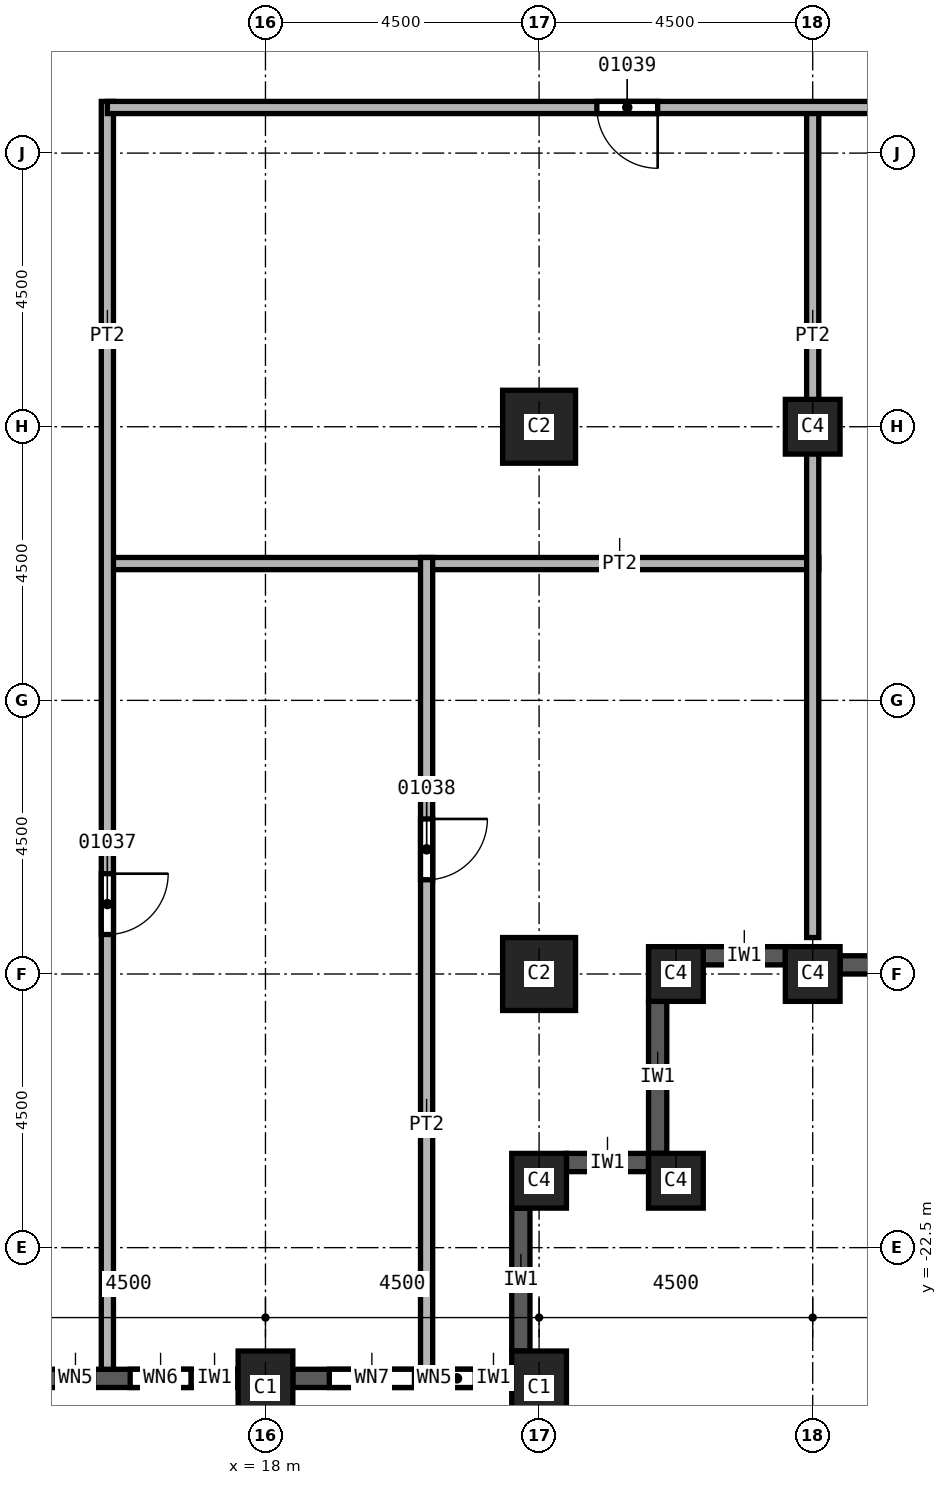
"""IFC4 building model, lengths in metres.
Left out: names, types, materials, properties, quantities, classifications, styles, units other than length and angle.
Written with IfcOpenShell. Run it as: python <this file> out.ifc"""

import sys

from ifc_helpers import new_model, si_unit, direction, frame, frame_2d, origin, origin_2d, place, context, subcontext, project, spatial, rectangle, extrude, element, fill, save


model = new_model("IFC4")
c1 = context("Model", 3, precision=1e-05, world=origin(), true_north=direction((0.0, 1.0)))
c2 = subcontext(c1, "Body", "Model", "MODEL_VIEW")
j1 = project(units=[si_unit("LENGTHUNIT", "METRE"), si_unit("PLANEANGLEUNIT", "RADIAN")], contexts=[c1])
p1 = place(None, origin())
s1 = spatial("IfcSite", under=j1, at=p1, CompositionType="ELEMENT")
p2 = place(p1, origin())
s2 = spatial("IfcBuilding", under=s1, at=p2, CompositionType="ELEMENT")
p3 = place(p2, frame((0.0, 0.0, 68.0)))
s3 = spatial("IfcBuildingStorey", under=s2, at=p3, CompositionType="ELEMENT", Elevation=68.0)
for number, where, z_axis, x_axis in (
    (1, (22.5, -9.0, 0.0), (0.0, 0.0, 1.0), (1.0, 0.0, 0.0)),
    (2, (22.5, -18.0, 0.0), (0.0, 0.0, 1.0), (1.0, 0.0, 0.0)),
):
    element("IfcColumn", number, at=place(p3, frame(where, z_axis=z_axis, x_axis=x_axis)), inside=s3, PredefinedType="COLUMN", context=c2, shape_type="SweptSolid", body=[
        extrude(rectangle(XDim=1.2, YDim=1.2, at=origin_2d()), origin(), (0.0, 0.0, 1.0), 3.7),
    ])
for number, where, z_axis, x_axis in (
    (3, (27.0, -9.0, 0.0), (0.0, 0.0, 1.0), (1.0, 0.0, 0.0)),
    (4, (27.0, -18.0, 0.0), (0.0, 0.0, 1.0), (1.0, 0.0, 0.0)),
):
    element("IfcColumn", number, at=place(p3, frame(where, z_axis=z_axis, x_axis=x_axis)), inside=s3, PredefinedType="COLUMN", context=c2, shape_type="SweptSolid", body=[
        extrude(rectangle(XDim=0.9, YDim=0.9, at=origin_2d()), origin(), (0.0, 0.0, 1.0), 3.7),
    ])
for number, where, z_axis, x_axis in (
    (5, (18.0, -24.8, 0.0), (0.0, 0.0, 1.0), (1.0, 0.0, 0.0)),
    (6, (22.5, -24.8, 0.0), (0.0, 0.0, 1.0), (1.0, 0.0, 0.0)),
):
    element("IfcColumn", number, at=place(p3, frame(where, z_axis=z_axis, x_axis=x_axis)), inside=s3, PredefinedType="COLUMN", context=c2, shape_type="SweptSolid", body=[
        extrude(rectangle(XDim=0.9, YDim=1.2, at=origin_2d()), origin(), (0.0, 0.0, 1.0), 3.7),
    ])
for number, where, z_axis, x_axis in (
    (7, (22.5, -21.4, 0.0), (0.0, 0.0, 1.0), (1.0, 0.0, 0.0)),
    (8, (24.75, -21.4, 0.0), (0.0, 0.0, 1.0), (1.0, 0.0, 0.0)),
    (9, (24.75, -18.0, 0.0), (0.0, 0.0, 1.0), (1.0, 0.0, 0.0)),
):
    element("IfcColumn", number, at=place(p3, frame(where, z_axis=z_axis, x_axis=x_axis)), inside=s3, PredefinedType="COLUMN", context=c2, shape_type="SweptSolid", body=[
        extrude(rectangle(XDim=0.9, YDim=0.9, at=origin_2d()), origin(), (0.0, 0.0, 1.0), 3.7),
    ])
p4 = place(p3, frame((13.95, -24.65, 0.0), z_axis=(0.0, 0.0, 1.0), x_axis=(1.0, 0.0, 0.0)))
e10 = element("IfcWall", 10, at=p4, inside=s3, PredefinedType="SOLIDWALL", context=c2, shape_type="SweptSolid", body=[
    extrude(rectangle(XDim=3.6, YDim=0.3, at=frame_2d((1.8, 0.0))), origin(), (0.0, 0.0, 1.0), 3.1),
])
p5 = place(p4, frame((0.625, 0.0, 0.8)))
e11 = element("IfcOpeningElement", 11, at=p5, cuts=e10, PredefinedType="OPENING", context=c2, shape_type="SweptSolid", body=[
    extrude(rectangle(XDim=0.6, YDim=1.95, at=frame_2d((0.3, 0.975))), frame((0.0, 0.15, 0.0), z_axis=(0.0, -1.0, 0.0), x_axis=(1.0, 0.0, 0.0)), (0.0, 0.0, 1.0), 0.3),
])
p6 = place(p4, frame((1.825, 0.0, 0.8)))
e12 = element("IfcOpeningElement", 12, at=p6, cuts=e10, PredefinedType="OPENING", context=c2, shape_type="SweptSolid", body=[
    extrude(rectangle(XDim=1.0, YDim=1.95, at=frame_2d((0.5, 0.975))), frame((0.0, 0.15, 0.0), z_axis=(0.0, -1.0, 0.0), x_axis=(1.0, 0.0, 0.0)), (0.0, 0.0, 1.0), 0.3),
])
p7 = place(p3, frame((18.45, -24.65, 0.0), z_axis=(0.0, 0.0, 1.0), x_axis=(1.0, 0.0, 0.0)))
e13 = element("IfcWall", 13, at=p7, inside=s3, PredefinedType="SOLIDWALL", context=c2, shape_type="SweptSolid", body=[
    extrude(rectangle(XDim=3.6, YDim=0.3, at=frame_2d((1.8, 0.0))), origin(), (0.0, 0.0, 1.0), 3.1),
])
p8 = place(p7, frame((0.6, 0.0, 0.8)))
e14 = element("IfcOpeningElement", 14, at=p8, cuts=e13, PredefinedType="OPENING", context=c2, shape_type="SweptSolid", body=[
    extrude(rectangle(XDim=1.4, YDim=1.95, at=frame_2d((0.7, 0.975))), frame((0.0, 0.15, 0.0), z_axis=(0.0, -1.0, 0.0), x_axis=(1.0, 0.0, 0.0)), (0.0, 0.0, 1.0), 0.3),
])
p9 = place(p7, frame((2.4, 0.0, 0.8)))
e15 = element("IfcOpeningElement", 15, at=p9, cuts=e13, PredefinedType="OPENING", context=c2, shape_type="SweptSolid", body=[
    extrude(rectangle(XDim=0.6, YDim=1.95, at=frame_2d((0.3, 0.975))), frame((0.0, 0.15, 0.0), z_axis=(0.0, -1.0, 0.0), x_axis=(1.0, 0.0, 0.0)), (0.0, 0.0, 1.0), 0.3),
])
p10 = place(p3, frame((22.2, -24.2, 0.0), z_axis=(0.0, 0.0, 1.0), x_axis=(0.0, 1.0, 0.0)))
e16 = element("IfcWall", 16, at=p10, inside=s3, PredefinedType="SOLIDWALL", context=c2, shape_type="SweptSolid", body=[
    extrude(rectangle(XDim=2.35, YDim=0.3, at=frame_2d((1.175, 0.0))), origin(), (0.0, 0.0, 1.0), 3.1),
])
p11 = place(p3, frame((22.95, -21.1, 0.0), z_axis=(0.0, 0.0, 1.0), x_axis=(1.0, 0.0, 0.0)))
e17 = element("IfcWall", 17, at=p11, inside=s3, PredefinedType="SOLIDWALL", context=c2, shape_type="SweptSolid", body=[
    extrude(rectangle(XDim=1.35, YDim=0.3, at=frame_2d((0.675, 0.0))), origin(), (0.0, 0.0, 1.0), 3.1),
])
p12 = place(p3, frame((24.45, -20.95, 0.0), z_axis=(0.0, 0.0, 1.0), x_axis=(0.0, 1.0, 0.0)))
e18 = element("IfcWall", 18, at=p12, inside=s3, PredefinedType="SOLIDWALL", context=c2, shape_type="SweptSolid", body=[
    extrude(rectangle(XDim=2.5, YDim=0.3, at=frame_2d((1.25, 0.0))), origin(), (0.0, 0.0, 1.0), 3.1),
])
p13 = place(p3, frame((25.2, -17.7, 0.0), z_axis=(0.0, 0.0, 1.0), x_axis=(1.0, 0.0, 0.0)))
e19 = element("IfcWall", 19, at=p13, inside=s3, PredefinedType="SOLIDWALL", context=c2, shape_type="SweptSolid", body=[
    extrude(rectangle(XDim=1.35, YDim=0.3, at=frame_2d((0.675, 0.0))), origin(), (0.0, 0.0, 1.0), 3.1),
])
p14 = place(p3, frame((27.45, -17.85, 0.0), z_axis=(0.0, 0.0, 1.0), x_axis=(1.0, 0.0, 0.0)))
e20 = element("IfcWall", 20, at=p14, inside=s3, PredefinedType="SOLIDWALL", context=c2, shape_type="SweptSolid", body=[
    extrude(rectangle(XDim=3.6, YDim=0.3, at=frame_2d((1.8, 0.0))), origin(), (0.0, 0.0, 1.0), 3.1),
])
p15 = place(p14, frame((0.6, 0.0, 0.8)))
e21 = element("IfcOpeningElement", 21, at=p15, cuts=e20, PredefinedType="OPENING", context=c2, shape_type="SweptSolid", body=[
    extrude(rectangle(XDim=2.4, YDim=1.95, at=frame_2d((1.2, 0.975))), frame((0.0, 0.15, 0.0), z_axis=(0.0, -1.0, 0.0), x_axis=(1.0, 0.0, 0.0)), (0.0, 0.0, 1.0), 0.3),
])
p16 = place(p3, frame((15.4, -11.25, 0.0), z_axis=(0.0, 0.0, 1.0), x_axis=(1.0, 0.0, 0.0)))
e22 = element("IfcWall", 22, at=p16, inside=s3, PredefinedType="PARTITIONING", context=c2, shape_type="SweptSolid", body=[
    extrude(rectangle(XDim=11.7, YDim=0.2, at=frame_2d((5.85, 0.0))), origin(), (0.0, 0.0, 1.0), 3.7),
])
p17 = place(p3, frame((15.4, -3.65, 0.0), z_axis=(0.0, 0.0, 1.0), x_axis=(0.0, -1.0, 0.0)))
e23 = element("IfcWall", 23, at=p17, inside=s3, PredefinedType="PARTITIONING", context=c2, shape_type="SweptSolid", body=[
    extrude(rectangle(XDim=20.85, YDim=0.2, at=frame_2d((10.425, 0.0))), origin(), (0.0, 0.0, 1.0), 3.7),
])
p18 = place(p17, frame((12.7, 0.0, 0.0)))
e24 = element("IfcOpeningElement", 24, at=p18, cuts=e23, PredefinedType="OPENING", context=c2, shape_type="SweptSolid", body=[
    extrude(rectangle(XDim=1.0, YDim=2.1, at=frame_2d((0.5, 1.05))), frame((0.0, 0.1, 0.0), z_axis=(0.0, -1.0, 0.0), x_axis=(1.0, 0.0, 0.0)), (0.0, 0.0, 1.0), 0.2),
])
p19 = place(p3, frame((20.65, -11.15, 0.0), z_axis=(0.0, 0.0, 1.0), x_axis=(0.0, -1.0, 0.0)))
e25 = element("IfcWall", 25, at=p19, inside=s3, PredefinedType="PARTITIONING", context=c2, shape_type="SweptSolid", body=[
    extrude(rectangle(XDim=13.35, YDim=0.2, at=frame_2d((6.675, 0.0))), origin(), (0.0, 0.0, 1.0), 3.7),
])
p20 = place(p19, frame((4.3, 0.0, 0.0)))
e26 = element("IfcOpeningElement", 26, at=p20, cuts=e25, PredefinedType="OPENING", context=c2, shape_type="SweptSolid", body=[
    extrude(rectangle(XDim=1.0, YDim=2.1, at=frame_2d((0.5, 1.05))), frame((0.0, 0.1, 0.0), z_axis=(0.0, -1.0, 0.0), x_axis=(1.0, 0.0, 0.0)), (0.0, 0.0, 1.0), 0.2),
])
p21 = place(p3, frame((27.0, -3.75, 0.0), z_axis=(0.0, 0.0, 1.0), x_axis=(0.0, -1.0, 0.0)))
e27 = element("IfcWall", 27, at=p21, inside=s3, PredefinedType="PARTITIONING", context=c2, shape_type="SweptSolid", body=[
    extrude(rectangle(XDim=13.65, YDim=0.2, at=frame_2d((6.825, 0.0))), origin(), (0.0, 0.0, 1.0), 3.7),
])
p22 = place(p3, frame((33.85, -3.75, 0.0), z_axis=(0.0, 0.0, 1.0), x_axis=(-1.0, 0.0, 0.0)))
e28 = element("IfcWall", 28, at=p22, inside=s3, PredefinedType="PARTITIONING", context=c2, shape_type="SweptSolid", body=[
    extrude(rectangle(XDim=18.45, YDim=0.2, at=frame_2d((9.225, 0.0))), origin(), (0.0, 0.0, 1.0), 3.7),
])
p23 = place(p22, frame((9.4, 0.0, 0.0)))
e29 = element("IfcOpeningElement", 29, at=p23, cuts=e28, PredefinedType="OPENING", context=c2, shape_type="SweptSolid", body=[
    extrude(rectangle(XDim=1.0, YDim=2.1, at=frame_2d((0.5, 1.05))), frame((0.0, 0.1, 0.0), z_axis=(0.0, -1.0, 0.0), x_axis=(1.0, 0.0, 0.0)), (0.0, 0.0, 1.0), 0.2),
])
p24 = place(p18, origin())
e30 = element("IfcDoor", 30, at=p24, inside=s3, OperationType="SINGLE_SWING_RIGHT", PredefinedType="DOOR", context=c2, shape_type="SweptSolid", body=[
    extrude(rectangle(XDim=1.0, YDim=2.1, at=frame_2d((0.5, 1.05))), frame((0.0, 0.025, 0.0), z_axis=(0.0, -1.0, 0.0), x_axis=(1.0, 0.0, 0.0)), (0.0, 0.0, 1.0), 0.05),
])
fill(e24, e30)
p25 = place(p20, origin())
e31 = element("IfcDoor", 31, at=p25, inside=s3, OperationType="SINGLE_SWING_LEFT", PredefinedType="DOOR", context=c2, shape_type="SweptSolid", body=[
    extrude(rectangle(XDim=1.0, YDim=2.1, at=frame_2d((0.5, 1.05))), frame((0.0, 0.025, 0.0), z_axis=(0.0, -1.0, 0.0), x_axis=(1.0, 0.0, 0.0)), (0.0, 0.0, 1.0), 0.05),
])
fill(e26, e31)
p26 = place(p23, origin())
e32 = element("IfcDoor", 32, at=p26, inside=s3, OperationType="SINGLE_SWING_RIGHT", PredefinedType="DOOR", context=c2, shape_type="SweptSolid", body=[
    extrude(rectangle(XDim=1.0, YDim=2.1, at=frame_2d((0.5, 1.05))), frame((0.0, 0.025, 0.0), z_axis=(0.0, -1.0, 0.0), x_axis=(1.0, 0.0, 0.0)), (0.0, 0.0, 1.0), 0.05),
])
fill(e29, e32)
p27 = place(p5, origin())
e33 = element("IfcWindow", 33, at=p27, inside=s3, PartitioningType="SINGLE_PANEL", PredefinedType="WINDOW", context=c2, shape_type="SweptSolid", body=[
    extrude(rectangle(XDim=0.6, YDim=1.95, at=frame_2d((0.3, 0.975))), frame((0.0, 0.03, 0.0), z_axis=(0.0, -1.0, 0.0), x_axis=(1.0, 0.0, 0.0)), (0.0, 0.0, 1.0), 0.06),
])
fill(e11, e33)
p28 = place(p6, origin())
e34 = element("IfcWindow", 34, at=p28, inside=s3, PartitioningType="SINGLE_PANEL", PredefinedType="WINDOW", context=c2, shape_type="SweptSolid", body=[
    extrude(rectangle(XDim=1.0, YDim=1.95, at=frame_2d((0.5, 0.975))), frame((0.0, 0.03, 0.0), z_axis=(0.0, -1.0, 0.0), x_axis=(1.0, 0.0, 0.0)), (0.0, 0.0, 1.0), 0.06),
])
fill(e12, e34)
p29 = place(p8, origin())
e35 = element("IfcWindow", 35, at=p29, inside=s3, PartitioningType="SINGLE_PANEL", PredefinedType="WINDOW", context=c2, shape_type="SweptSolid", body=[
    extrude(rectangle(XDim=1.4, YDim=1.95, at=frame_2d((0.7, 0.975))), frame((0.0, 0.03, 0.0), z_axis=(0.0, -1.0, 0.0), x_axis=(1.0, 0.0, 0.0)), (0.0, 0.0, 1.0), 0.06),
])
fill(e14, e35)
p30 = place(p9, origin())
e36 = element("IfcWindow", 36, at=p30, inside=s3, PartitioningType="SINGLE_PANEL", PredefinedType="WINDOW", context=c2, shape_type="SweptSolid", body=[
    extrude(rectangle(XDim=0.6, YDim=1.95, at=frame_2d((0.3, 0.975))), frame((0.0, 0.03, 0.0), z_axis=(0.0, -1.0, 0.0), x_axis=(1.0, 0.0, 0.0)), (0.0, 0.0, 1.0), 0.06),
])
fill(e15, e36)
save(model, sys.argv[1])
